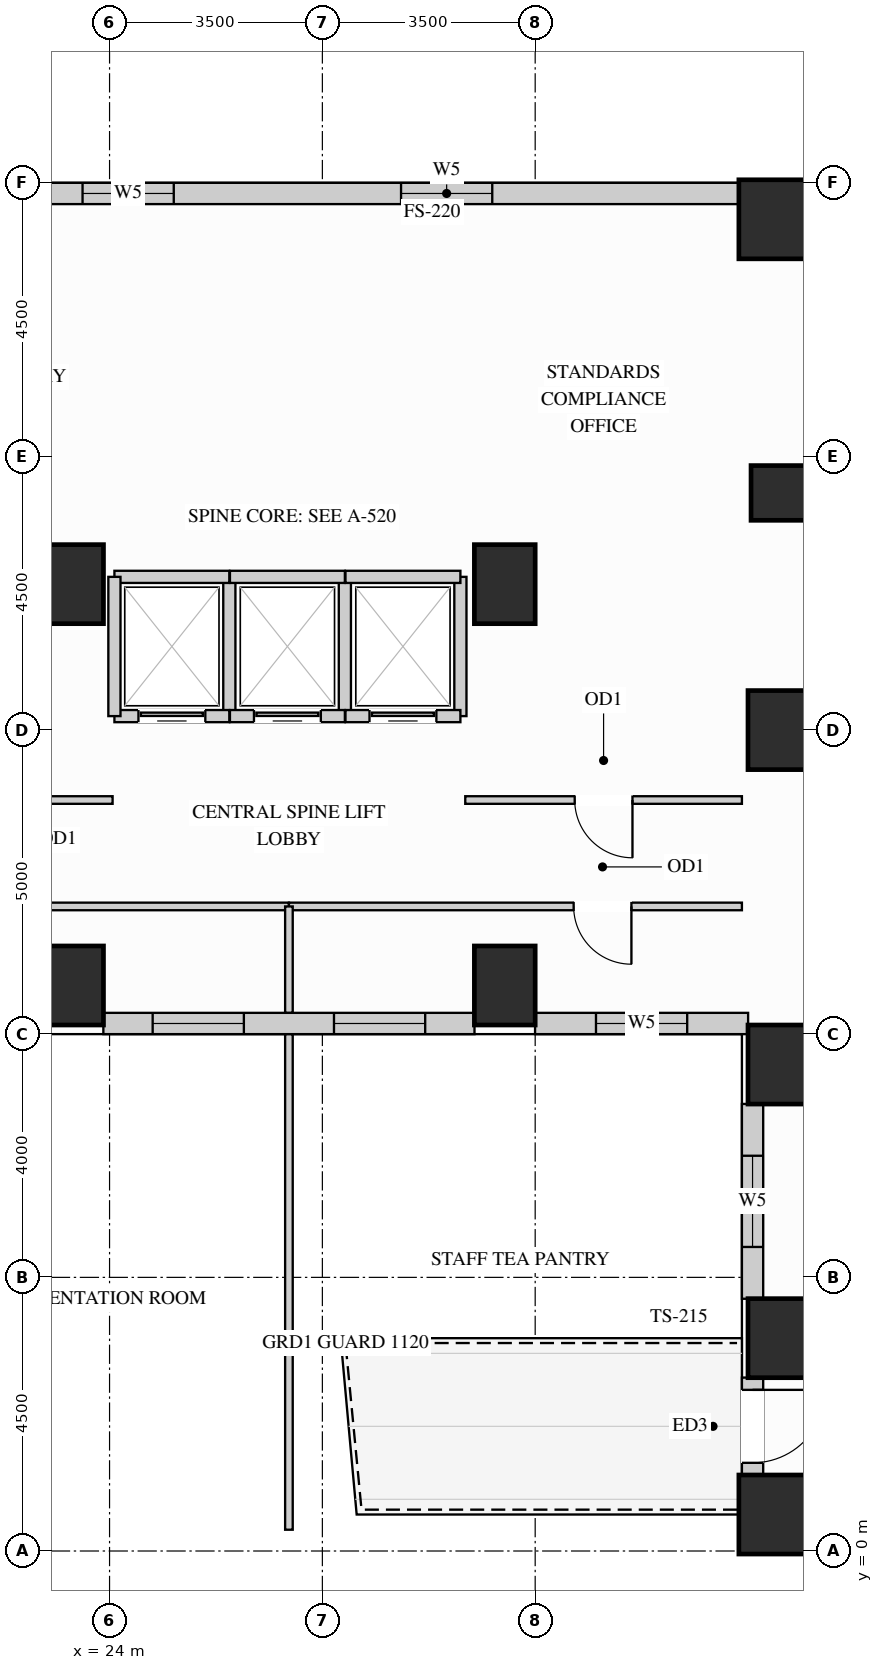
"""IFC4 building model, lengths in metres.
Left out: names, types, materials, properties, quantities, classifications, styles, units other than length and angle.
Written with IfcOpenShell. Run it as: python <this file> out.ifc"""

import sys

from ifc_helpers import new_model, si_unit, direction, frame, frame_2d, origin, origin_2d, place, context, subcontext, project, spatial, rectangle, extrude, source, transform, mapped, element, fill, save


model = new_model("IFC4")
c1 = context("Model", 3, precision=1e-05, world=origin(), true_north=direction((0.0, 1.0)))
c2 = subcontext(c1, "Body", "Model", "MODEL_VIEW")
j1 = project(units=[si_unit("LENGTHUNIT", "METRE"), si_unit("PLANEANGLEUNIT", "RADIAN")], contexts=[c1])
p1 = place(None, origin())
s1 = spatial("IfcSite", under=j1, at=p1, CompositionType="ELEMENT")
p2 = place(p1, origin())
s2 = spatial("IfcBuilding", under=s1, at=p2, CompositionType="ELEMENT")
p3 = place(p2, frame((0.0, 0.0, 47.7)))
s3 = spatial("IfcBuildingStorey", under=s2, at=p3, CompositionType="ELEMENT", Elevation=47.7)
m1 = source(origin(), c2, "Body", "SweptSolid", [
    extrude(rectangle(XDim=0.9, YDim=0.9, at=origin_2d()), origin(), (0.0, 0.0, 1.0), 3.38),
])
p4 = place(p3, frame((35.0, 17.4, 0.0), z_axis=(0.0, 0.0, 1.0), x_axis=(1.0, 0.0, 0.0)))
e1 = element("IfcColumn", 1, at=p4, inside=s3, PredefinedType="COLUMN", context=c2, shape_type="MappedRepresentation", body=[
    mapped(m1, transform((0.0, 0.0, 0.0), x_axis=(1.0, 0.0, 0.0), y_axis=(0.0, 1.0, 0.0), z_axis=(0.0, 0.0, 1.0))),
])
m2 = source(origin(), c2, "Body", "SweptSolid", [
    extrude(rectangle(XDim=1.0, YDim=1.3, at=origin_2d()), origin(), (0.0, 0.0, 1.0), 3.38),
])
for number, where, z_axis, x_axis in (
    (2, (35.0, 13.5, 0.0), (0.0, 0.0, 1.0), (1.0, 0.0, 0.0)),
    (3, (35.0, 3.5, 0.0), (0.0, 0.0, 1.0), (1.0, 0.0, 0.0)),
    (4, (35.0, 8.0, 0.0), (0.0, 0.0, 1.0), (1.0, 0.0, 0.0)),
    (5, (23.4, 15.9, 0.0), (0.0, 0.0, 1.0), (1.0, 0.0, 0.0)),
    (6, (23.4, 9.3, 0.0), (0.0, 0.0, 1.0), (1.0, 0.0, 0.0)),
    (7, (30.5, 15.9, 0.0), (0.0, 0.0, 1.0), (1.0, 0.0, 0.0)),
    (8, (30.5, 9.3, 0.0), (0.0, 0.0, 1.0), (1.0, 0.0, 0.0)),
):
    element("IfcColumn", number, at=place(p3, frame(where, z_axis=z_axis, x_axis=x_axis)), inside=s3, PredefinedType="COLUMN", context=c2, shape_type="MappedRepresentation", body=[
        mapped(m2, transform((0.0, 0.0, 0.0), x_axis=(1.0, 0.0, 0.0), y_axis=(0.0, 1.0, 0.0), z_axis=(0.0, 0.0, 1.0))),
    ])
m3 = source(origin(), c2, "Body", "SweptSolid", [
    extrude(rectangle(XDim=1.3, YDim=1.3, at=origin_2d()), origin(), (0.0, 0.0, 1.0), 3.38),
])
for number, where, z_axis, x_axis in (
    (9, (35.0, 21.9, 0.0), (0.0, 0.0, 1.0), (1.0, 0.0, 0.0)),
    (10, (35.0, 0.6, 0.0), (0.0, 0.0, 1.0), (1.0, 0.0, 0.0)),
):
    element("IfcColumn", number, at=place(p3, frame(where, z_axis=z_axis, x_axis=x_axis)), inside=s3, PredefinedType="COLUMN", context=c2, shape_type="MappedRepresentation", body=[
        mapped(m3, transform((0.0, 0.0, 0.0), x_axis=(1.0, 0.0, 0.0), y_axis=(0.0, 1.0, 0.0), z_axis=(0.0, 0.0, 1.0))),
    ])
p5 = place(p3, frame((23.898, 8.675, 0.0), z_axis=(0.0, 0.0, 1.0), x_axis=(1.0, 0.0, 0.0)))
e11 = element("IfcWall", 11, at=p5, inside=s3, PredefinedType="SOLIDWALL", context=c2, shape_type="SweptSolid", body=[
    extrude(rectangle(XDim=6.104, YDim=0.35, at=frame_2d((3.052, 0.0))), origin(), (0.0, 0.0, 1.0), 3.365),
])
p6 = place(p5, frame((0.811, 0.0, 0.78)))
e12 = element("IfcOpeningElement", 12, at=p6, cuts=e11, PredefinedType="OPENING", context=c2, shape_type="SweptSolid", body=[
    extrude(rectangle(XDim=1.5, YDim=2.0, at=frame_2d((0.75, 1.0))), frame((0.0, 0.185, 0.0), z_axis=(0.0, -1.0, 0.0), x_axis=(1.0, 0.0, 0.0)), (0.0, 0.0, 1.0), 0.37),
])
p7 = place(p5, frame((3.793, 0.0, 0.78)))
e13 = element("IfcOpeningElement", 13, at=p7, cuts=e11, PredefinedType="OPENING", context=c2, shape_type="SweptSolid", body=[
    extrude(rectangle(XDim=1.5, YDim=2.0, at=frame_2d((0.75, 1.0))), frame((0.0, 0.185, 0.0), z_axis=(0.0, -1.0, 0.0), x_axis=(1.0, 0.0, 0.0)), (0.0, 0.0, 1.0), 0.37),
])
p8 = place(p3, frame((30.998, 8.675, 0.0), z_axis=(0.0, 0.0, 1.0), x_axis=(1.0, 0.0, 0.0)))
e14 = element("IfcWall", 14, at=p8, inside=s3, PredefinedType="SOLIDWALL", context=c2, shape_type="SweptSolid", body=[
    extrude(rectangle(XDim=3.504, YDim=0.35, at=frame_2d((1.752, 0.0))), origin(), (0.0, 0.0, 1.0), 3.365),
])
p9 = place(p8, frame((1.002, 0.0, 0.78)))
e15 = element("IfcOpeningElement", 15, at=p9, cuts=e14, PredefinedType="OPENING", context=c2, shape_type="SweptSolid", body=[
    extrude(rectangle(XDim=1.5, YDim=2.0, at=frame_2d((0.75, 1.0))), frame((0.0, 0.185, 0.0), z_axis=(0.0, -1.0, 0.0), x_axis=(1.0, 0.0, 0.0)), (0.0, 0.0, 1.0), 0.37),
])
p10 = place(p3, frame((34.575, 7.352, 0.0), z_axis=(0.0, 0.0, 1.0), x_axis=(0.0, -1.0, 0.0)))
e16 = element("IfcWall", 16, at=p10, inside=s3, PredefinedType="SOLIDWALL", context=c2, shape_type="SweptSolid", body=[
    extrude(rectangle(XDim=3.204, YDim=0.35, at=frame_2d((1.602, 0.0))), origin(), (0.0, 0.0, 1.0), 2.51),
])
p11 = place(p10, frame((0.852, 0.0, 0.78)))
e17 = element("IfcOpeningElement", 17, at=p11, cuts=e16, PredefinedType="OPENING", context=c2, shape_type="SweptSolid", body=[
    extrude(rectangle(XDim=1.5, YDim=1.55, at=frame_2d((0.75, 0.775))), frame((0.0, 0.185, 0.0), z_axis=(0.0, -1.0, 0.0), x_axis=(1.0, 0.0, 0.0)), (0.0, 0.0, 1.0), 0.37),
])
p12 = place(p3, frame((34.575, 2.852, 0.0), z_axis=(0.0, 0.0, 1.0), x_axis=(0.0, -1.0, 0.0)))
e18 = element("IfcWall", 18, at=p12, inside=s3, PredefinedType="SOLIDWALL", context=c2, shape_type="SweptSolid", body=[
    extrude(rectangle(XDim=1.604, YDim=0.35, at=frame_2d((0.802, 0.0))), origin(), (0.0, 0.0, 1.0), 2.51),
])
p13 = place(p12, frame((0.202, 0.0, 0.0)))
e19 = element("IfcOpeningElement", 19, at=p13, cuts=e18, PredefinedType="OPENING", context=c2, shape_type="SweptSolid", body=[
    extrude(rectangle(XDim=1.2, YDim=2.15, at=frame_2d((0.6, 1.075))), frame((0.0, 0.185, 0.0), z_axis=(0.0, -1.0, 0.0), x_axis=(1.0, 0.0, 0.0)), (0.0, 0.0, 1.0), 0.37),
])
p14 = place(p3, frame((34.352, 22.325, 0.0), z_axis=(0.0, 0.0, 1.0), x_axis=(-1.0, 0.0, 0.0)))
e20 = element("IfcWall", 20, at=p14, inside=s3, PredefinedType="SOLIDWALL", context=c2, shape_type="SweptSolid", body=[
    extrude(rectangle(XDim=14.854, YDim=0.35, at=frame_2d((7.427, 0.0))), origin(), (0.0, 0.0, 1.0), 3.365),
])
p15 = place(p14, frame((4.058, 0.0, 0.78)))
e21 = element("IfcOpeningElement", 21, at=p15, cuts=e20, PredefinedType="OPENING", context=c2, shape_type="SweptSolid", body=[
    extrude(rectangle(XDim=1.5, YDim=2.0, at=frame_2d((0.75, 1.0))), frame((0.0, 0.185, 0.0), z_axis=(0.0, -1.0, 0.0), x_axis=(1.0, 0.0, 0.0)), (0.0, 0.0, 1.0), 0.37),
])
p16 = place(p14, frame((9.296, 0.0, 0.78)))
e22 = element("IfcOpeningElement", 22, at=p16, cuts=e20, PredefinedType="OPENING", context=c2, shape_type="SweptSolid", body=[
    extrude(rectangle(XDim=1.5, YDim=2.0, at=frame_2d((0.75, 1.0))), frame((0.0, 0.185, 0.0), z_axis=(0.0, -1.0, 0.0), x_axis=(1.0, 0.0, 0.0)), (0.0, 0.0, 1.0), 0.37),
])
p17 = place(p3, frame((29.85, 12.35, 0.0), z_axis=(0.0, 0.0, 1.0), x_axis=(1.0, 0.0, 0.0)))
e23 = element("IfcWall", 23, at=p17, inside=s3, PredefinedType="PARTITIONING", context=c2, shape_type="SweptSolid", body=[
    extrude(rectangle(XDim=4.55, YDim=0.125, at=frame_2d((2.275, 0.0))), origin(), (0.0, 0.0, 1.0), 3.365),
])
p18 = place(p17, frame((1.8, 0.0, 0.0)))
e24 = element("IfcOpeningElement", 24, at=p18, cuts=e23, PredefinedType="OPENING", context=c2, shape_type="SweptSolid", body=[
    extrude(rectangle(XDim=0.95, YDim=2.15, at=frame_2d((0.475, 1.075))), frame((0.0, 0.073, 0.0), z_axis=(0.0, -1.0, 0.0), x_axis=(1.0, 0.0, 0.0)), (0.0, 0.0, 1.0), 0.145),
])
p19 = place(p3, frame((19.5, 12.35, 0.0), z_axis=(0.0, 0.0, 1.0), x_axis=(1.0, 0.0, 0.0)))
e25 = element("IfcWall", 25, at=p19, inside=s3, PredefinedType="PARTITIONING", context=c2, shape_type="SweptSolid", body=[
    extrude(rectangle(XDim=4.55, YDim=0.125, at=frame_2d((2.275, 0.0))), origin(), (0.0, 0.0, 1.0), 3.365),
])
p20 = place(p19, frame((1.8, 0.0, 0.0)))
e26 = element("IfcOpeningElement", 26, at=p20, cuts=e25, PredefinedType="OPENING", context=c2, shape_type="SweptSolid", body=[
    extrude(rectangle(XDim=0.95, YDim=2.15, at=frame_2d((0.475, 1.075))), frame((0.0, 0.073, 0.0), z_axis=(0.0, -1.0, 0.0), x_axis=(1.0, 0.0, 0.0)), (0.0, 0.0, 1.0), 0.145),
])
p21 = place(p3, frame((19.5, 10.6, 0.0), z_axis=(0.0, 0.0, 1.0), x_axis=(1.0, 0.0, 0.0)))
e27 = element("IfcWall", 27, at=p21, inside=s3, PredefinedType="PARTITIONING", context=c2, shape_type="SweptSolid", body=[
    extrude(rectangle(XDim=7.45, YDim=0.125, at=frame_2d((3.725, 0.0))), origin(), (0.0, 0.0, 1.0), 3.365),
])
p22 = place(p21, frame((1.817, 0.0, 0.0)))
e28 = element("IfcOpeningElement", 28, at=p22, cuts=e27, PredefinedType="OPENING", context=c2, shape_type="SweptSolid", body=[
    extrude(rectangle(XDim=0.95, YDim=2.15, at=frame_2d((0.475, 1.075))), frame((0.0, 0.073, 0.0), z_axis=(0.0, -1.0, 0.0), x_axis=(1.0, 0.0, 0.0)), (0.0, 0.0, 1.0), 0.145),
])
p23 = place(p3, frame((26.95, 10.6, 0.0), z_axis=(0.0, 0.0, 1.0), x_axis=(1.0, 0.0, 0.0)))
e29 = element("IfcWall", 29, at=p23, inside=s3, PredefinedType="PARTITIONING", context=c2, shape_type="SweptSolid", body=[
    extrude(rectangle(XDim=7.45, YDim=0.125, at=frame_2d((3.725, 0.0))), origin(), (0.0, 0.0, 1.0), 3.365),
])
p24 = place(p23, frame((4.683, 0.0, 0.0)))
e30 = element("IfcOpeningElement", 30, at=p24, cuts=e29, PredefinedType="OPENING", context=c2, shape_type="SweptSolid", body=[
    extrude(rectangle(XDim=0.95, YDim=2.15, at=frame_2d((0.475, 1.075))), frame((0.0, 0.073, 0.0), z_axis=(0.0, -1.0, 0.0), x_axis=(1.0, 0.0, 0.0)), (0.0, 0.0, 1.0), 0.145),
])
m4 = source(origin(), c2, "Body", "SweptSolid", [
    extrude(rectangle(XDim=8.148, YDim=0.125, at=frame_2d((4.074, 0.0))), origin(), (0.0, 0.0, 1.0), 3.365),
])
p25 = place(p3, frame((26.95, 0.35, 0.0), z_axis=(0.0, 0.0, 1.0), x_axis=(0.0, 1.0, 0.0)))
e31 = element("IfcWall", 31, at=p25, inside=s3, PredefinedType="PARTITIONING", context=c2, shape_type="MappedRepresentation", body=[
    mapped(m4, transform((0.0, 0.0, 0.0), x_axis=(1.0, 0.0, 0.0), y_axis=(0.0, 1.0, 0.0), z_axis=(0.0, 0.0, 1.0))),
])
m5 = source(origin(), c2, "Body", "SweptSolid", [
    extrude(rectangle(XDim=1.748, YDim=0.125, at=frame_2d((0.874, 0.0))), origin(), (0.0, 0.0, 1.0), 3.365),
])
p26 = place(p3, frame((26.95, 8.852, 0.0), z_axis=(0.0, 0.0, 1.0), x_axis=(0.0, 1.0, 0.0)))
e32 = element("IfcWall", 32, at=p26, inside=s3, PredefinedType="PARTITIONING", context=c2, shape_type="MappedRepresentation", body=[
    mapped(m5, transform((0.0, 0.0, 0.0), x_axis=(1.0, 0.0, 0.0), y_axis=(0.0, 1.0, 0.0), z_axis=(0.0, 0.0, 1.0))),
])
m6 = source(origin(), c2, "Body", "SweptSolid", [
    extrude(rectangle(XDim=2.29, YDim=0.2, at=frame_2d((1.145, 0.0))), origin(), (0.0, 0.0, 1.0), 3.365),
])
p27 = place(p3, frame((25.97, 13.73, 0.0), z_axis=(0.0, 0.0, 1.0), x_axis=(0.0, 1.0, 0.0)))
e33 = element("IfcWall", 33, at=p27, inside=s3, PredefinedType="PARTITIONING", context=c2, shape_type="MappedRepresentation", body=[
    mapped(m6, transform((0.0, 0.0, 0.0), x_axis=(1.0, 0.0, 0.0), y_axis=(0.0, 1.0, 0.0), z_axis=(0.0, 0.0, 1.0))),
])
m7 = source(origin(), c2, "Body", "SweptSolid", [
    extrude(rectangle(XDim=1.89, YDim=0.2, at=frame_2d((0.945, 0.0))), origin(), (0.0, 0.0, 1.0), 2.67),
])
p28 = place(p3, frame((24.08, 16.02, 0.0), z_axis=(0.0, 0.0, 1.0), x_axis=(1.0, 0.0, 0.0)))
e34 = element("IfcWall", 34, at=p28, inside=s3, PredefinedType="PARTITIONING", context=c2, shape_type="MappedRepresentation", body=[
    mapped(m7, transform((0.0, 0.0, 0.0), x_axis=(1.0, 0.0, 0.0), y_axis=(0.0, 1.0, 0.0), z_axis=(0.0, 0.0, 1.0))),
])
p29 = place(p3, frame((24.08, 13.73, 0.0), z_axis=(0.0, 0.0, 1.0), x_axis=(1.0, 0.0, 0.0)))
e35 = element("IfcWall", 35, at=p29, inside=s3, PredefinedType="PARTITIONING", context=c2, shape_type="SweptSolid", body=[
    extrude(rectangle(XDim=1.89, YDim=0.2, at=frame_2d((0.945, 0.0))), origin(), (0.0, 0.0, 1.0), 2.446),
])
p30 = place(p29, frame((0.395, 0.0, 0.0)))
e36 = element("IfcOpeningElement", 36, at=p30, cuts=e35, PredefinedType="OPENING", context=c2, shape_type="SweptSolid", body=[
    extrude(rectangle(XDim=1.1, YDim=2.2, at=frame_2d((0.55, 1.1))), frame((0.0, 0.11, 0.0), z_axis=(0.0, -1.0, 0.0), x_axis=(1.0, 0.0, 0.0)), (0.0, 0.0, 1.0), 0.22),
])
for number, where, z_axis, x_axis in (
    (37, (24.08, 13.73, 0.0), (0.0, 0.0, 1.0), (0.0, 1.0, 0.0)),
    (38, (27.87, 13.73, 0.0), (0.0, 0.0, 1.0), (0.0, 1.0, 0.0)),
):
    element("IfcWall", number, at=place(p3, frame(where, z_axis=z_axis, x_axis=x_axis)), inside=s3, PredefinedType="PARTITIONING", context=c2, shape_type="MappedRepresentation", body=[
        mapped(m6, transform((0.0, 0.0, 0.0), x_axis=(1.0, 0.0, 0.0), y_axis=(0.0, 1.0, 0.0), z_axis=(0.0, 0.0, 1.0))),
    ])
m8 = source(origin(), c2, "Body", "SweptSolid", [
    extrude(rectangle(XDim=1.89, YDim=0.2, at=frame_2d((0.945, 0.0))), origin(), (0.0, 0.0, 1.0), 2.67),
])
p31 = place(p3, frame((25.98, 16.02, 0.0), z_axis=(0.0, 0.0, 1.0), x_axis=(1.0, 0.0, 0.0)))
e39 = element("IfcWall", 39, at=p31, inside=s3, PredefinedType="PARTITIONING", context=c2, shape_type="MappedRepresentation", body=[
    mapped(m8, transform((0.0, 0.0, 0.0), x_axis=(1.0, 0.0, 0.0), y_axis=(0.0, 1.0, 0.0), z_axis=(0.0, 0.0, 1.0))),
])
p32 = place(p3, frame((25.98, 13.73, 0.0), z_axis=(0.0, 0.0, 1.0), x_axis=(1.0, 0.0, 0.0)))
e40 = element("IfcWall", 40, at=p32, inside=s3, PredefinedType="PARTITIONING", context=c2, shape_type="SweptSolid", body=[
    extrude(rectangle(XDim=1.89, YDim=0.2, at=frame_2d((0.945, 0.0))), origin(), (0.0, 0.0, 1.0), 2.446),
])
p33 = place(p32, frame((0.395, 0.0, 0.0)))
e41 = element("IfcOpeningElement", 41, at=p33, cuts=e40, PredefinedType="OPENING", context=c2, shape_type="SweptSolid", body=[
    extrude(rectangle(XDim=1.1, YDim=2.2, at=frame_2d((0.55, 1.1))), frame((0.0, 0.11, 0.0), z_axis=(0.0, -1.0, 0.0), x_axis=(1.0, 0.0, 0.0)), (0.0, 0.0, 1.0), 0.22),
])
p34 = place(p3, frame((29.77, 13.73, 0.0), z_axis=(0.0, 0.0, 1.0), x_axis=(0.0, 1.0, 0.0)))
e42 = element("IfcWall", 42, at=p34, inside=s3, PredefinedType="PARTITIONING", context=c2, shape_type="MappedRepresentation", body=[
    mapped(m6, transform((0.0, 0.0, 0.0), x_axis=(1.0, 0.0, 0.0), y_axis=(0.0, 1.0, 0.0), z_axis=(0.0, 0.0, 1.0))),
])
p35 = place(p3, frame((27.88, 16.02, 0.0), z_axis=(0.0, 0.0, 1.0), x_axis=(1.0, 0.0, 0.0)))
e43 = element("IfcWall", 43, at=p35, inside=s3, PredefinedType="PARTITIONING", context=c2, shape_type="MappedRepresentation", body=[
    mapped(m8, transform((0.0, 0.0, 0.0), x_axis=(1.0, 0.0, 0.0), y_axis=(0.0, 1.0, 0.0), z_axis=(0.0, 0.0, 1.0))),
])
p36 = place(p3, frame((27.88, 13.73, 0.0), z_axis=(0.0, 0.0, 1.0), x_axis=(1.0, 0.0, 0.0)))
e44 = element("IfcWall", 44, at=p36, inside=s3, PredefinedType="PARTITIONING", context=c2, shape_type="SweptSolid", body=[
    extrude(rectangle(XDim=1.89, YDim=0.2, at=frame_2d((0.945, 0.0))), origin(), (0.0, 0.0, 1.0), 2.446),
])
p37 = place(p36, frame((0.395, 0.0, 0.0)))
e45 = element("IfcOpeningElement", 45, at=p37, cuts=e44, PredefinedType="OPENING", context=c2, shape_type="SweptSolid", body=[
    extrude(rectangle(XDim=1.1, YDim=2.2, at=frame_2d((0.55, 1.1))), frame((0.0, 0.11, 0.0), z_axis=(0.0, -1.0, 0.0), x_axis=(1.0, 0.0, 0.0)), (0.0, 0.0, 1.0), 0.22),
])
m9 = source(origin(), c2, "Body", "SweptSolid", [
    extrude(rectangle(XDim=1.2, YDim=2.15, at=frame_2d((0.6, 1.075))), frame((0.0, 0.025, 0.0), z_axis=(0.0, -1.0, 0.0), x_axis=(1.0, 0.0, 0.0)), (0.0, 0.0, 1.0), 0.05),
])
p38 = place(p13, frame((1.2, 0.0, 0.0), z_axis=(0.0, 0.0, 1.0), x_axis=(-1.0, 0.0, 0.0)))
e46 = element("IfcDoor", 46, at=p38, inside=s3, OperationType="SINGLE_SWING_LEFT", PredefinedType="DOOR", context=c2, shape_type="MappedRepresentation", body=[
    mapped(m9, transform((0.0, 0.0, 0.0), x_axis=(1.0, 0.0, 0.0), y_axis=(0.0, 1.0, 0.0), z_axis=(0.0, 0.0, 1.0))),
])
fill(e19, e46)
m10 = source(origin(), c2, "Body", "SweptSolid", [
    extrude(rectangle(XDim=1.1, YDim=2.2, at=frame_2d((0.55, 1.1))), frame((0.0, 0.025, 0.0), z_axis=(0.0, -1.0, 0.0), x_axis=(1.0, 0.0, 0.0)), (0.0, 0.0, 1.0), 0.05),
])
p39 = place(p30, origin())
e47 = element("IfcDoor", 47, at=p39, inside=s3, OperationType="SLIDING_TO_LEFT", PredefinedType="DOOR", context=c2, shape_type="MappedRepresentation", body=[
    mapped(m10, transform((0.0, 0.0, 0.0), x_axis=(1.0, 0.0, 0.0), y_axis=(0.0, 1.0, 0.0), z_axis=(0.0, 0.0, 1.0))),
])
fill(e36, e47)
p40 = place(p33, origin())
e48 = element("IfcDoor", 48, at=p40, inside=s3, OperationType="SLIDING_TO_LEFT", PredefinedType="DOOR", context=c2, shape_type="MappedRepresentation", body=[
    mapped(m10, transform((0.0, 0.0, 0.0), x_axis=(1.0, 0.0, 0.0), y_axis=(0.0, 1.0, 0.0), z_axis=(0.0, 0.0, 1.0))),
])
fill(e41, e48)
p41 = place(p37, origin())
e49 = element("IfcDoor", 49, at=p41, inside=s3, OperationType="SLIDING_TO_LEFT", PredefinedType="DOOR", context=c2, shape_type="MappedRepresentation", body=[
    mapped(m10, transform((0.0, 0.0, 0.0), x_axis=(1.0, 0.0, 0.0), y_axis=(0.0, 1.0, 0.0), z_axis=(0.0, 0.0, 1.0))),
])
fill(e45, e49)
m11 = source(origin(), c2, "Body", "SweptSolid", [
    extrude(rectangle(XDim=0.95, YDim=2.15, at=frame_2d((0.475, 1.075))), frame((0.0, 0.025, 0.0), z_axis=(0.0, -1.0, 0.0), x_axis=(1.0, 0.0, 0.0)), (0.0, 0.0, 1.0), 0.05),
])
p42 = place(p18, origin())
e50 = element("IfcDoor", 50, at=p42, inside=s3, OperationType="SINGLE_SWING_RIGHT", PredefinedType="DOOR", context=c2, shape_type="MappedRepresentation", body=[
    mapped(m11, transform((0.0, 0.0, 0.0), x_axis=(1.0, 0.0, 0.0), y_axis=(0.0, 1.0, 0.0), z_axis=(0.0, 0.0, 1.0))),
])
fill(e24, e50)
p43 = place(p24, origin())
e51 = element("IfcDoor", 51, at=p43, inside=s3, OperationType="SINGLE_SWING_RIGHT", PredefinedType="DOOR", context=c2, shape_type="MappedRepresentation", body=[
    mapped(m11, transform((0.0, 0.0, 0.0), x_axis=(1.0, 0.0, 0.0), y_axis=(0.0, 1.0, 0.0), z_axis=(0.0, 0.0, 1.0))),
])
fill(e30, e51)
m12 = source(origin(), c2, "Body", "SweptSolid", [
    extrude(rectangle(XDim=1.5, YDim=2.0, at=frame_2d((0.75, 1.0))), frame((0.0, 0.03, 0.0), z_axis=(0.0, -1.0, 0.0), x_axis=(1.0, 0.0, 0.0)), (0.0, 0.0, 1.0), 0.06),
])
p44 = place(p6, origin())
e52 = element("IfcWindow", 52, at=p44, inside=s3, PartitioningType="SINGLE_PANEL", PredefinedType="WINDOW", context=c2, shape_type="MappedRepresentation", body=[
    mapped(m12, transform((0.0, 0.0, 0.0), x_axis=(1.0, 0.0, 0.0), y_axis=(0.0, 1.0, 0.0), z_axis=(0.0, 0.0, 1.0))),
])
fill(e12, e52)
p45 = place(p7, origin())
e53 = element("IfcWindow", 53, at=p45, inside=s3, PartitioningType="SINGLE_PANEL", PredefinedType="WINDOW", context=c2, shape_type="MappedRepresentation", body=[
    mapped(m12, transform((0.0, 0.0, 0.0), x_axis=(1.0, 0.0, 0.0), y_axis=(0.0, 1.0, 0.0), z_axis=(0.0, 0.0, 1.0))),
])
fill(e13, e53)
p46 = place(p9, origin())
e54 = element("IfcWindow", 54, at=p46, inside=s3, PartitioningType="SINGLE_PANEL", PredefinedType="WINDOW", context=c2, shape_type="MappedRepresentation", body=[
    mapped(m12, transform((0.0, 0.0, 0.0), x_axis=(1.0, 0.0, 0.0), y_axis=(0.0, 1.0, 0.0), z_axis=(0.0, 0.0, 1.0))),
])
fill(e15, e54)
m13 = source(origin(), c2, "Body", "SweptSolid", [
    extrude(rectangle(XDim=1.5, YDim=1.55, at=frame_2d((0.75, 0.775))), frame((0.0, 0.03, 0.0), z_axis=(0.0, -1.0, 0.0), x_axis=(1.0, 0.0, 0.0)), (0.0, 0.0, 1.0), 0.06),
])
p47 = place(p11, origin())
e55 = element("IfcWindow", 55, at=p47, inside=s3, PartitioningType="SINGLE_PANEL", PredefinedType="WINDOW", context=c2, shape_type="MappedRepresentation", body=[
    mapped(m13, transform((0.0, 0.0, 0.0), x_axis=(1.0, 0.0, 0.0), y_axis=(0.0, 1.0, 0.0), z_axis=(0.0, 0.0, 1.0))),
])
fill(e17, e55)
p48 = place(p15, origin())
e56 = element("IfcWindow", 56, at=p48, inside=s3, PartitioningType="SINGLE_PANEL", PredefinedType="WINDOW", context=c2, shape_type="MappedRepresentation", body=[
    mapped(m12, transform((0.0, 0.0, 0.0), x_axis=(1.0, 0.0, 0.0), y_axis=(0.0, 1.0, 0.0), z_axis=(0.0, 0.0, 1.0))),
])
fill(e21, e56)
p49 = place(p16, origin())
e57 = element("IfcWindow", 57, at=p49, inside=s3, PartitioningType="SINGLE_PANEL", PredefinedType="WINDOW", context=c2, shape_type="MappedRepresentation", body=[
    mapped(m12, transform((0.0, 0.0, 0.0), x_axis=(1.0, 0.0, 0.0), y_axis=(0.0, 1.0, 0.0), z_axis=(0.0, 0.0, 1.0))),
])
fill(e22, e57)
save(model, sys.argv[1])
